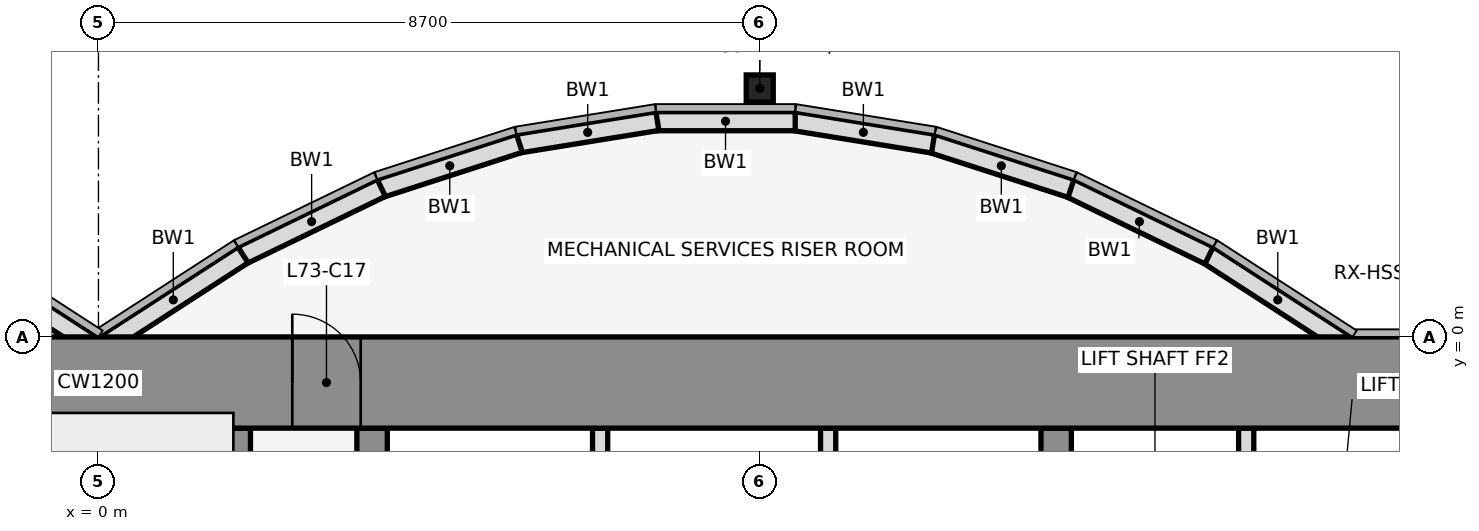
"""IFC4 building model, lengths in metres.
Left out: names, types, materials, properties, quantities, classifications, styles, units other than length and angle.
Written with IfcOpenShell. Run it as: python <this file> out.ifc"""

import sys

from ifc_helpers import new_model, si_unit, direction, frame, frame_2d, origin, origin_2d, place, context, subcontext, project, spatial, rectangle, hollow_rectangle, extrude, element, fill, save


model = new_model("IFC4")
c1 = context("Model", 3, precision=1e-05, world=origin(), true_north=direction((0.0, 1.0)))
c2 = subcontext(c1, "Body", "Model", "MODEL_VIEW")
j1 = project(units=[si_unit("LENGTHUNIT", "METRE"), si_unit("PLANEANGLEUNIT", "RADIAN")], contexts=[c1])
p1 = place(None, origin())
s1 = spatial("IfcSite", under=j1, at=p1, CompositionType="ELEMENT")
p2 = place(p1, origin())
s2 = spatial("IfcBuilding", under=s1, at=p2, CompositionType="ELEMENT")
p3 = place(p2, frame((0.0, 0.0, 324.5)))
s3 = spatial("IfcBuildingStorey", under=s2, at=p3, CompositionType="ELEMENT", Elevation=324.5)
p4 = place(p3, frame((8.7, 3.269, 0.0), z_axis=(0.0, 0.0, 1.0), x_axis=(1.0, 0.0, 0.0)))
e1 = element("IfcColumn", 1, at=p4, inside=s3, PredefinedType="COLUMN", context=c2, shape_type="SweptSolid", body=[
    extrude(hollow_rectangle(XDim=0.356, YDim=0.356, WallThickness=0.012, at=origin_2d()), origin(), (0.0, 0.0, 1.0), 4.5),
])
p5 = place(p3, frame((16.432, -0.105, 0.0), z_axis=(0.0, 0.0, 1.0), x_axis=(-0.83981312244, 0.542875602121, 0.0)))
e2 = element("IfcWall", 2, at=p5, inside=s3, PredefinedType="STANDARD", context=c2, shape_type="SweptSolid", body=[
    extrude(rectangle(XDim=2.183, YDim=0.25, at=frame_2d((1.091, 0.0))), origin(), (0.0, 0.0, 1.0), 4.35),
])
p6 = place(p3, frame((14.612, 1.073, 0.0), z_axis=(0.0, 0.0, 1.0), x_axis=(-0.89982408427, 0.436252928206, 0.0)))
e3 = element("IfcWall", 3, at=p6, inside=s3, PredefinedType="STANDARD", context=c2, shape_type="SweptSolid", body=[
    extrude(rectangle(XDim=2.038, YDim=0.25, at=frame_2d((1.019, 0.0))), origin(), (0.0, 0.0, 1.0), 4.35),
])
p7 = place(p3, frame((12.795, 1.955, 0.0), z_axis=(0.0, 0.0, 1.0), x_axis=(-0.951495806175, 0.307661714928, 0.0)))
e4 = element("IfcWall", 4, at=p7, inside=s3, PredefinedType="STANDARD", context=c2, shape_type="SweptSolid", body=[
    extrude(rectangle(XDim=1.927, YDim=0.25, at=frame_2d((0.963, 0.0))), origin(), (0.0, 0.0, 1.0), 4.35),
])
p8 = place(p3, frame((10.98, 2.543, 0.0), z_axis=(0.0, 0.0, 1.0), x_axis=(-0.987181718931, 0.159600293885, 0.0)))
e5 = element("IfcWall", 5, at=p8, inside=s3, PredefinedType="STANDARD", context=c2, shape_type="SweptSolid", body=[
    extrude(rectangle(XDim=1.857, YDim=0.25, at=frame_2d((0.929, 0.0))), origin(), (0.0, 0.0, 1.0), 4.35),
])
p9 = place(p3, frame((9.167, 2.838, 0.0), z_axis=(0.0, 0.0, 1.0), x_axis=(-1.0, 0.0, 0.0)))
e6 = element("IfcWall", 6, at=p9, inside=s3, PredefinedType="STANDARD", context=c2, shape_type="SweptSolid", body=[
    extrude(rectangle(XDim=1.833, YDim=0.25, at=frame_2d((0.917, 0.0))), origin(), (0.0, 0.0, 1.0), 4.35),
])
p10 = place(p3, frame((7.353, 2.84, 0.0), z_axis=(0.0, 0.0, 1.0), x_axis=(-0.987181718931, -0.159600293885, 0.0)))
e7 = element("IfcWall", 7, at=p10, inside=s3, PredefinedType="STANDARD", context=c2, shape_type="SweptSolid", body=[
    extrude(rectangle(XDim=1.857, YDim=0.25, at=frame_2d((0.929, 0.0))), origin(), (0.0, 0.0, 1.0), 4.35),
])
p11 = place(p3, frame((5.538, 2.548, 0.0), z_axis=(0.0, 0.0, 1.0), x_axis=(-0.951495806175, -0.307661714928, 0.0)))
e8 = element("IfcWall", 8, at=p11, inside=s3, PredefinedType="STANDARD", context=c2, shape_type="SweptSolid", body=[
    extrude(rectangle(XDim=1.927, YDim=0.25, at=frame_2d((0.963, 0.0))), origin(), (0.0, 0.0, 1.0), 4.35),
])
p12 = place(p3, frame((3.721, 1.962, 0.0), z_axis=(0.0, 0.0, 1.0), x_axis=(-0.89982408427, -0.436252928206, 0.0)))
e9 = element("IfcWall", 9, at=p12, inside=s3, PredefinedType="STANDARD", context=c2, shape_type="SweptSolid", body=[
    extrude(rectangle(XDim=2.038, YDim=0.25, at=frame_2d((1.019, 0.0))), origin(), (0.0, 0.0, 1.0), 4.35),
])
for number, where, z_axis, x_axis in (
    (10, (1.901, 1.08, 0.0), (0.0, 0.0, 1.0), (-0.84, -0.543, 0.0)),
    (11, (-0.068, -0.105, 0.0), (0.0, 0.0, 1.0), (-0.84, 0.543, 0.0)),
):
    element("IfcWall", number, at=place(p3, frame(where, z_axis=z_axis, x_axis=x_axis)), inside=s3, PredefinedType="STANDARD", context=c2, shape_type="SweptSolid", body=[
        extrude(rectangle(XDim=2.183, YDim=0.25, at=frame_2d((1.091, 0.0))), origin(), (0.0, 0.0, 1.0), 4.35),
    ])
p13 = place(p3, frame((1.8, -11.8, 0.0), z_axis=(0.0, 0.0, 1.0), x_axis=(0.0, 1.0, 0.0)))
e12 = element("IfcWall", 12, at=p13, inside=s3, PredefinedType="SHEAR", context=c2, shape_type="SweptSolid", body=[
    extrude(rectangle(XDim=10.6, YDim=0.4, at=frame_2d((5.3, 0.0))), origin(), (0.0, 0.0, 1.0), 4.5),
])
p14 = place(p3, frame((3.6, -11.8, 0.0), z_axis=(0.0, 0.0, 1.0), x_axis=(0.0, 1.0, 0.0)))
e13 = element("IfcWall", 13, at=p14, inside=s3, PredefinedType="SHEAR", context=c2, shape_type="SweptSolid", body=[
    extrude(rectangle(XDim=10.6, YDim=0.4, at=frame_2d((5.3, 0.0))), origin(), (0.0, 0.0, 1.0), 4.5),
])
p15 = place(p14, frame((1.35, 0.0, 0.0)))
e14 = element("IfcOpeningElement", 14, at=p15, cuts=e13, PredefinedType="OPENING", context=c2, shape_type="SweptSolid", body=[
    extrude(rectangle(XDim=0.9, YDim=2.1, at=frame_2d((0.45, 1.05))), frame((0.0, 0.212, 0.0), z_axis=(0.0, -1.0, 0.0), x_axis=(1.0, 0.0, 0.0)), (0.0, 0.0, 1.0), 0.424),
])
for number, where, z_axis, x_axis in (
    (15, (6.6, -4.6, 0.0), (0.0, 0.0, 1.0), (0.0, 1.0, 0.0)),
    (16, (9.6, -4.6, 0.0), (0.0, 0.0, 1.0), (0.0, 1.0, 0.0)),
):
    element("IfcWall", number, at=place(p3, frame(where, z_axis=z_axis, x_axis=x_axis)), inside=s3, PredefinedType="PARTITIONING", context=c2, shape_type="SweptSolid", body=[
        extrude(rectangle(XDim=3.4, YDim=0.2, at=frame_2d((1.7, 0.0))), origin(), (0.0, 0.0, 1.0), 3.418),
    ])
p16 = place(p3, frame((12.6, -11.8, 0.0), z_axis=(0.0, 0.0, 1.0), x_axis=(0.0, 1.0, 0.0)))
e17 = element("IfcWall", 17, at=p16, inside=s3, PredefinedType="SHEAR", context=c2, shape_type="SweptSolid", body=[
    extrude(rectangle(XDim=10.6, YDim=0.4, at=frame_2d((5.3, 0.0))), origin(), (0.0, 0.0, 1.0), 4.5),
])
p17 = place(p16, frame((4.75, 0.0, 0.0)))
e18 = element("IfcOpeningElement", 18, at=p17, cuts=e17, PredefinedType="OPENING", context=c2, shape_type="SweptSolid", body=[
    extrude(rectangle(XDim=1.1, YDim=2.1, at=frame_2d((0.55, 1.05))), frame((0.0, 0.212, 0.0), z_axis=(0.0, -1.0, 0.0), x_axis=(1.0, 0.0, 0.0)), (0.0, 0.0, 1.0), 0.424),
])
p18 = place(p3, frame((15.1, -4.6, 0.0), z_axis=(0.0, 0.0, 1.0), x_axis=(0.0, 1.0, 0.0)))
e19 = element("IfcWall", 19, at=p18, inside=s3, PredefinedType="PARTITIONING", context=c2, shape_type="SweptSolid", body=[
    extrude(rectangle(XDim=3.4, YDim=0.2, at=frame_2d((1.7, 0.0))), origin(), (0.0, 0.0, 1.0), 3.418),
])
p19 = place(p3, frame((-22.0, -0.6, 0.0), z_axis=(0.0, 0.0, 1.0), x_axis=(1.0, 0.0, 0.0)))
e20 = element("IfcWall", 20, at=p19, inside=s3, PredefinedType="SHEAR", context=c2, shape_type="SweptSolid", body=[
    extrude(rectangle(XDim=44.0, YDim=1.2, at=frame_2d((22.0, 0.0))), origin(), (0.0, 0.0, 1.0), 4.5),
])
p20 = place(p19, frame((18.55, 0.0, 0.0)))
e21 = element("IfcOpeningElement", 21, at=p20, cuts=e20, PredefinedType="OPENING", context=c2, shape_type="SweptSolid", body=[
    extrude(rectangle(XDim=0.9, YDim=2.1, at=frame_2d((0.45, 1.05))), frame((0.0, 0.612, 0.0), z_axis=(0.0, -1.0, 0.0), x_axis=(1.0, 0.0, 0.0)), (0.0, 0.0, 1.0), 1.224),
])
p21 = place(p19, frame((24.55, 0.0, 0.0)))
e22 = element("IfcOpeningElement", 22, at=p21, cuts=e20, PredefinedType="OPENING", context=c2, shape_type="SweptSolid", body=[
    extrude(rectangle(XDim=0.9, YDim=2.1, at=frame_2d((0.45, 1.05))), frame((0.0, 0.612, 0.0), z_axis=(0.0, -1.0, 0.0), x_axis=(1.0, 0.0, 0.0)), (0.0, 0.0, 1.0), 1.224),
])
p22 = place(p21, origin())
e23 = element("IfcDoor", 23, at=p22, inside=s3, OperationType="SINGLE_SWING_LEFT", PredefinedType="DOOR", context=c2, shape_type="SweptSolid", body=[
    extrude(rectangle(XDim=0.9, YDim=2.1, at=frame_2d((0.45, 1.05))), frame((0.0, 0.025, 0.0), z_axis=(0.0, -1.0, 0.0), x_axis=(1.0, 0.0, 0.0)), (0.0, 0.0, 1.0), 0.05),
])
fill(e22, e23)
save(model, sys.argv[1])
